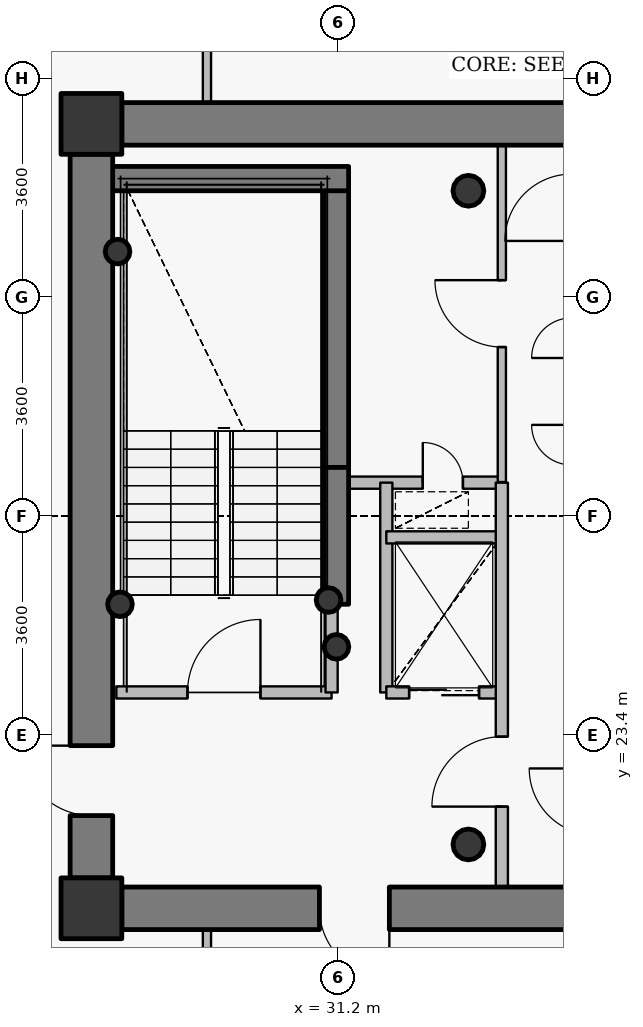
"""IFC4 building model, lengths in metres.
Left out: names, types, materials, properties, quantities, classifications, styles, units other than length and angle.
Written with IfcOpenShell. Run it as: python <this file> out.ifc"""

import sys

from ifc_helpers import new_model, si_unit, direction, frame, frame_2d, origin, origin_2d, place, context, subcontext, project, spatial, rectangle, hollow_circle, extrude, source, transform, mapped, element, fill, save


model = new_model("IFC4")
c1 = context("Model", 3, precision=1e-05, world=origin(), true_north=direction((0.0, 1.0)))
c2 = subcontext(c1, "Body", "Model", "MODEL_VIEW")
j1 = project(units=[si_unit("LENGTHUNIT", "METRE"), si_unit("PLANEANGLEUNIT", "RADIAN")], contexts=[c1])
p1 = place(None, origin())
s1 = spatial("IfcSite", under=j1, at=p1, CompositionType="ELEMENT")
p2 = place(p1, origin())
s2 = spatial("IfcBuilding", under=s1, at=p2, CompositionType="ELEMENT")
p3 = place(p2, frame((0.0, 0.0, 318.0)))
s3 = spatial("IfcBuildingStorey", under=s2, at=p3, CompositionType="ELEMENT", Elevation=318.0)
for number, where, z_axis, x_axis in (
    (1, (27.15, 20.55, 0.0), (0.0, 0.0, 1.0), (1.0, 0.0, 0.0)),
    (2, (27.15, 33.45, 0.0), (0.0, 0.0, 1.0), (1.0, 0.0, 0.0)),
):
    element("IfcColumn", number, at=place(p3, frame(where, z_axis=z_axis, x_axis=x_axis)), inside=s3, PredefinedType="COLUMN", context=c2, shape_type="SweptSolid", body=[
        extrude(rectangle(XDim=1.0, YDim=1.0, at=origin_2d()), origin(), (0.0, 0.0, 1.0), 6.0),
    ])
for number, where, z_axis, x_axis in (
    (3, (33.35, 21.6, 0.0), (0.0, 0.0, 1.0), (1.0, 0.0, 0.0)),
    (4, (33.35, 32.35, 0.0), (0.0, 0.0, 1.0), (1.0, 0.0, 0.0)),
):
    element("IfcColumn", number, at=place(p3, frame(where, z_axis=z_axis, x_axis=x_axis)), inside=s3, PredefinedType="COLUMN", context=c2, shape_type="SweptSolid", body=[
        extrude(hollow_circle(Radius=0.254, WallThickness=0.02, at=origin_2d()), origin(), (0.0, 0.0, 1.0), 6.0),
    ])
p4 = place(p3, frame((31.18, 27.8, 0.0), z_axis=(0.0, 0.0, 1.0), x_axis=(0.0, 1.0, 0.0)))
e5 = element("IfcWall", 5, at=p4, inside=s3, PredefinedType="SHEAR", context=c2, shape_type="SweptSolid", body=[
    extrude(rectangle(XDim=4.75, YDim=0.4, at=frame_2d((2.375, 0.0))), origin(), (0.0, 0.0, 1.0), 6.0),
])
p5 = place(p3, frame((27.25, 32.55, 0.0), z_axis=(0.0, 0.0, 1.0), x_axis=(1.0, 0.0, 0.0)))
e6 = element("IfcWall", 6, at=p5, inside=s3, PredefinedType="SHEAR", context=c2, shape_type="SweptSolid", body=[
    extrude(rectangle(XDim=4.13, YDim=0.4, at=frame_2d((2.065, 0.0))), origin(), (0.0, 0.0, 1.0), 6.0),
])
for number, where, z_axis, x_axis in (
    (7, (27.58, 31.35, 0.0), (0.0, 0.0, 1.0), (1.0, 0.0, 0.0)),
    (8, (31.05, 25.62, 0.0), (0.0, 0.0, 1.0), (1.0, 0.0, 0.0)),
    (9, (31.18, 24.85, 0.0), (0.0, 0.0, 1.0), (1.0, 0.0, 0.0)),
    (10, (27.62, 25.55, 0.0), (0.0, 0.0, 1.0), (1.0, 0.0, 0.0)),
):
    element("IfcColumn", number, at=place(p3, frame(where, z_axis=z_axis, x_axis=x_axis)), inside=s3, PredefinedType="COLUMN", context=c2, shape_type="SweptSolid", body=[
        extrude(hollow_circle(Radius=0.203, WallThickness=0.016, at=origin_2d()), origin(), (0.0, 0.0, 1.0), 6.0),
    ])
p6 = place(p3, frame((27.65, 33.45, 0.0), z_axis=(0.0, 0.0, 1.0), x_axis=(1.0, 0.0, 0.0)))
e11 = element("IfcWall", 11, at=p6, inside=s3, PredefinedType="SHEAR", context=c2, shape_type="SweptSolid", body=[
    extrude(rectangle(XDim=16.7, YDim=0.7, at=frame_2d((8.35, 0.0))), origin(), (0.0, 0.0, 1.0), 5.3),
])
p7 = place(p6, frame((12.15, 0.0, 0.0)))
e12 = element("IfcOpeningElement", 12, at=p7, cuts=e11, PredefinedType="OPENING", context=c2, shape_type="SweptSolid", body=[
    extrude(rectangle(XDim=1.15, YDim=2.15, at=origin_2d()), frame((0.575, 0.36, 1.075), z_axis=(0.0, -1.0, 0.0), x_axis=(1.0, 0.0, 0.0)), (0.0, 0.0, 1.0), 0.72),
])
p8 = place(p3, frame((44.35, 20.55, 0.0), z_axis=(0.0, 0.0, 1.0), x_axis=(-1.0, 0.0, 0.0)))
e13 = element("IfcWall", 13, at=p8, inside=s3, PredefinedType="SHEAR", context=c2, shape_type="SweptSolid", body=[
    extrude(rectangle(XDim=16.7, YDim=0.7, at=frame_2d((8.35, 0.0))), origin(), (0.0, 0.0, 1.0), 5.3),
])
p9 = place(p8, frame((12.3, 0.0, 0.0)))
e14 = element("IfcOpeningElement", 14, at=p9, cuts=e13, PredefinedType="OPENING", context=c2, shape_type="SweptSolid", body=[
    extrude(rectangle(XDim=1.15, YDim=2.15, at=origin_2d()), frame((0.575, 0.36, 1.075), z_axis=(0.0, -1.0, 0.0), x_axis=(1.0, 0.0, 0.0)), (0.0, 0.0, 1.0), 0.72),
])
p10 = place(p3, frame((27.15, 21.05, 0.0), z_axis=(0.0, 0.0, 1.0), x_axis=(0.0, 1.0, 0.0)))
e15 = element("IfcWall", 15, at=p10, inside=s3, PredefinedType="SHEAR", context=c2, shape_type="SweptSolid", body=[
    extrude(rectangle(XDim=11.9, YDim=0.7, at=frame_2d((5.95, 0.0))), origin(), (0.0, 0.0, 1.0), 5.3),
])
p11 = place(p10, frame((1.025, 0.0, 0.0)))
e16 = element("IfcOpeningElement", 16, at=p11, cuts=e15, PredefinedType="OPENING", context=c2, shape_type="SweptSolid", body=[
    extrude(rectangle(XDim=1.15, YDim=2.15, at=origin_2d()), frame((0.575, 0.36, 1.075), z_axis=(0.0, -1.0, 0.0), x_axis=(1.0, 0.0, 0.0)), (0.0, 0.0, 1.0), 0.72),
])
p12 = place(p3, frame((31.18, 25.55, 0.0), z_axis=(0.0, 0.0, 1.0), x_axis=(0.0, 1.0, 0.0)))
e17 = element("IfcWall", 17, at=p12, inside=s3, PredefinedType="SHEAR", context=c2, shape_type="SweptSolid", body=[
    extrude(rectangle(XDim=2.25, YDim=0.4, at=frame_2d((1.125, 0.0))), origin(), (0.0, 0.0, 1.0), 5.35),
])
p13 = place(p3, frame((27.56, 24.1, 0.0), z_axis=(0.0, 0.0, 1.0), x_axis=(1.0, 0.0, 0.0)))
e18 = element("IfcWall", 18, at=p13, inside=s3, PredefinedType="PARTITIONING", context=c2, shape_type="SweptSolid", body=[
    extrude(rectangle(XDim=3.54, YDim=0.2, at=frame_2d((1.77, 0.0))), origin(), (0.0, 0.0, 1.0), 5.75),
])
p14 = place(p13, frame((1.17, 0.0, 0.0)))
e19 = element("IfcOpeningElement", 19, at=p14, cuts=e18, PredefinedType="OPENING", context=c2, shape_type="SweptSolid", body=[
    extrude(rectangle(XDim=1.2, YDim=2.15, at=origin_2d()), frame((0.6, 0.11, 1.075), z_axis=(0.0, -1.0, 0.0), x_axis=(1.0, 0.0, 0.0)), (0.0, 0.0, 1.0), 0.22),
])
p15 = place(p3, frame((29.05, 13.663, 0.0), z_axis=(0.0, 0.0, 1.0), x_axis=(0.0, 1.0, 0.0)))
e20 = element("IfcWall", 20, at=p15, inside=s3, PredefinedType="PARTITIONING", context=c2, shape_type="SweptSolid", body=[
    extrude(rectangle(XDim=6.537, YDim=0.135, at=frame_2d((3.269, 0.0))), origin(), (0.0, 0.0, 1.0), 4.235),
])
p16 = place(p15, frame((4.517, 0.0, 0.0)))
e21 = element("IfcOpeningElement", 21, at=p16, cuts=e20, PredefinedType="OPENING", context=c2, shape_type="SweptSolid", body=[
    extrude(rectangle(XDim=1.1, YDim=2.15, at=origin_2d()), frame((0.55, 0.078, 1.075), z_axis=(0.0, -1.0, 0.0), x_axis=(1.0, 0.0, 0.0)), (0.0, 0.0, 1.0), 0.155),
])
p17 = place(p3, frame((29.05, 33.8, 0.0), z_axis=(0.0, 0.0, 1.0), x_axis=(0.0, 1.0, 0.0)))
e22 = element("IfcWall", 22, at=p17, inside=s3, PredefinedType="PARTITIONING", context=c2, shape_type="SweptSolid", body=[
    extrude(rectangle(XDim=2.9, YDim=0.135, at=frame_2d((1.45, 0.0))), origin(), (0.0, 0.0, 1.0), 5.75),
])
p18 = place(p3, frame((31.1, 24.1, 0.0), z_axis=(0.0, 0.0, 1.0), x_axis=(0.0, 1.0, 0.0)))
e23 = element("IfcWall", 23, at=p18, inside=s3, PredefinedType="PARTITIONING", context=c2, shape_type="SweptSolid", body=[
    extrude(rectangle(XDim=1.44, YDim=0.2, at=frame_2d((0.72, 0.0))), origin(), (0.0, 0.0, 1.0), 5.75),
])
p19 = place(p3, frame((31.1, 27.55, 0.0), z_axis=(0.0, 0.0, 1.0), x_axis=(1.0, 0.0, 0.0)))
e24 = element("IfcWall", 24, at=p19, inside=s3, PredefinedType="PARTITIONING", context=c2, shape_type="SweptSolid", body=[
    extrude(rectangle(XDim=2.8, YDim=0.2, at=frame_2d((1.4, 0.0))), origin(), (0.0, 0.0, 1.0), 5.335),
])
p20 = place(p19, frame((1.5, 0.0, 0.0)))
e25 = element("IfcOpeningElement", 25, at=p20, cuts=e24, PredefinedType="OPENING", context=c2, shape_type="SweptSolid", body=[
    extrude(rectangle(XDim=0.66, YDim=2.05, at=origin_2d()), frame((0.33, 0.11, 1.025), z_axis=(0.0, -1.0, 0.0), x_axis=(1.0, 0.0, 0.0)), (0.0, 0.0, 1.0), 0.22),
])
p21 = place(p3, frame((32.0, 24.1, 0.0), z_axis=(0.0, 0.0, 1.0), x_axis=(0.0, 1.0, 0.0)))
e26 = element("IfcWall", 26, at=p21, inside=s3, PredefinedType="PARTITIONING", context=c2, shape_type="SweptSolid", body=[
    extrude(rectangle(XDim=3.45, YDim=0.2, at=frame_2d((1.725, 0.0))), origin(), (0.0, 0.0, 1.0), 5.75),
])
p22 = place(p3, frame((32.0, 24.1, 0.0), z_axis=(0.0, 0.0, 1.0), x_axis=(1.0, 0.0, 0.0)))
e27 = element("IfcWall", 27, at=p22, inside=s3, PredefinedType="PARTITIONING", context=c2, shape_type="SweptSolid", body=[
    extrude(rectangle(XDim=1.9, YDim=0.2, at=frame_2d((0.95, 0.0))), origin(), (0.0, 0.0, 1.0), 5.335),
])
p23 = place(p22, frame((0.375, 0.0, 0.0)))
e28 = element("IfcOpeningElement", 28, at=p23, cuts=e27, PredefinedType="OPENING", context=c2, shape_type="SweptSolid", body=[
    extrude(rectangle(XDim=1.15, YDim=2.15, at=origin_2d()), frame((0.575, 0.11, 1.075), z_axis=(0.0, -1.0, 0.0), x_axis=(1.0, 0.0, 0.0)), (0.0, 0.0, 1.0), 0.22),
])
p24 = place(p3, frame((32.0, 26.65, 0.0), z_axis=(0.0, 0.0, 1.0), x_axis=(1.0, 0.0, 0.0)))
e29 = element("IfcWall", 29, at=p24, inside=s3, PredefinedType="PARTITIONING", context=c2, shape_type="SweptSolid", body=[
    extrude(rectangle(XDim=1.9, YDim=0.2, at=frame_2d((0.95, 0.0))), origin(), (0.0, 0.0, 1.0), 5.335),
])
p25 = place(p3, frame((33.9, 20.9, 0.0), z_axis=(0.0, 0.0, 1.0), x_axis=(0.0, 1.0, 0.0)))
e30 = element("IfcWall", 30, at=p25, inside=s3, PredefinedType="PARTITIONING", context=c2, shape_type="SweptSolid", body=[
    extrude(rectangle(XDim=6.65, YDim=0.2, at=frame_2d((3.325, 0.0))), origin(), (0.0, 0.0, 1.0), 5.335),
])
p26 = place(p25, frame((1.323, 0.0, 0.0)))
e31 = element("IfcOpeningElement", 31, at=p26, cuts=e30, PredefinedType="OPENING", context=c2, shape_type="SweptSolid", body=[
    extrude(rectangle(XDim=1.15, YDim=2.15, at=origin_2d()), frame((0.575, 0.11, 1.075), z_axis=(0.0, -1.0, 0.0), x_axis=(1.0, 0.0, 0.0)), (0.0, 0.0, 1.0), 0.22),
])
p27 = place(p3, frame((33.9, 27.56, 0.0), z_axis=(0.0, 0.0, 1.0), x_axis=(0.0, 1.0, 0.0)))
e32 = element("IfcWall", 32, at=p27, inside=s3, PredefinedType="PARTITIONING", context=c2, shape_type="SweptSolid", body=[
    extrude(rectangle(XDim=5.54, YDim=0.135, at=frame_2d((2.77, 0.0))), origin(), (0.0, 0.0, 1.0), 5.335),
])
p28 = place(p27, frame((2.22, 0.0, 0.0)))
e33 = element("IfcOpeningElement", 33, at=p28, cuts=e32, PredefinedType="OPENING", context=c2, shape_type="SweptSolid", body=[
    extrude(rectangle(XDim=1.1, YDim=2.15, at=origin_2d()), frame((0.55, 0.078, 1.075), z_axis=(0.0, -1.0, 0.0), x_axis=(1.0, 0.0, 0.0)), (0.0, 0.0, 1.0), 0.155),
])
p29 = place(p3, frame((27.64, 33.8, 0.0), z_axis=(0.0, 0.0, 1.0), x_axis=(-1.0, 0.0, 0.0)))
e34 = element("IfcWall", 34, at=p29, inside=s3, PredefinedType="PARTITIONING", context=c2, shape_type="SweptSolid", body=[
    extrude(rectangle(XDim=0.84, YDim=0.135, at=frame_2d((0.42, 0.0))), origin(), (0.0, 0.0, 1.0), 2.832),
])
p30 = place(p3, frame((26.8, 33.492, 0.0), z_axis=(0.0, 0.0, 1.0), x_axis=(0.0, -1.0, 0.0)))
e35 = element("IfcWall", 35, at=p30, inside=s3, PredefinedType="PARTITIONING", context=c2, shape_type="SweptSolid", body=[
    extrude(rectangle(XDim=0.532, YDim=0.135, at=frame_2d((0.266, 0.0))), origin(), (0.0, 0.0, 1.0), 5.75),
])
p31 = place(p3, frame((26.8, 21.04, 0.0), z_axis=(0.0, 0.0, 1.0), x_axis=(0.0, -1.0, 0.0)))
e36 = element("IfcWall", 36, at=p31, inside=s3, PredefinedType="PARTITIONING", context=c2, shape_type="SweptSolid", body=[
    extrude(rectangle(XDim=0.84, YDim=0.135, at=frame_2d((0.42, 0.0))), origin(), (0.0, 0.0, 1.0), 2.832),
])
p32 = place(p3, frame((27.107, 20.2, 0.0), z_axis=(0.0, 0.0, 1.0), x_axis=(1.0, 0.0, 0.0)))
e37 = element("IfcWall", 37, at=p32, inside=s3, PredefinedType="PARTITIONING", context=c2, shape_type="SweptSolid", body=[
    extrude(rectangle(XDim=0.532, YDim=0.135, at=frame_2d((0.266, 0.0))), origin(), (0.0, 0.0, 1.0), 4.235),
])
m1 = source(origin(), c2, "Body", "SweptSolid", [
    extrude(rectangle(XDim=1.15, YDim=2.15, at=origin_2d()), frame((0.575, 0.025, 1.075), z_axis=(0.0, -1.0, 0.0), x_axis=(1.0, 0.0, 0.0)), (0.0, 0.0, 1.0), 0.05),
])
p33 = place(p9, origin())
e38 = element("IfcDoor", 38, at=p33, inside=s3, OperationType="SINGLE_SWING_LEFT", PredefinedType="DOOR", context=c2, shape_type="MappedRepresentation", body=[
    mapped(m1, transform((0.0, 0.0, 0.0), x_axis=(1.0, 0.0, 0.0), y_axis=(0.0, 1.0, 0.0), z_axis=(0.0, 0.0, 1.0), scale=1.0)),
])
fill(e14, e38)
p34 = place(p11, origin())
e39 = element("IfcDoor", 39, at=p34, inside=s3, OperationType="SINGLE_SWING_RIGHT", PredefinedType="DOOR", context=c2, shape_type="MappedRepresentation", body=[
    mapped(m1, transform((0.0, 0.0, 0.0), x_axis=(1.0, 0.0, 0.0), y_axis=(0.0, 1.0, 0.0), z_axis=(0.0, 0.0, 1.0), scale=1.0)),
])
fill(e16, e39)
p35 = place(p26, origin())
e40 = element("IfcDoor", 40, at=p35, inside=s3, OperationType="SINGLE_SWING_LEFT", PredefinedType="DOOR", context=c2, shape_type="MappedRepresentation", body=[
    mapped(m1, transform((0.0, 0.0, 0.0), x_axis=(1.0, 0.0, 0.0), y_axis=(0.0, 1.0, 0.0), z_axis=(0.0, 0.0, 1.0), scale=1.0)),
])
fill(e31, e40)
m2 = source(origin(), c2, "Body", "SweptSolid", [
    extrude(rectangle(XDim=1.2, YDim=2.15, at=origin_2d()), frame((0.6, 0.025, 1.075), z_axis=(0.0, -1.0, 0.0), x_axis=(1.0, 0.0, 0.0)), (0.0, 0.0, 1.0), 0.05),
])
p36 = place(p14, origin())
e41 = element("IfcDoor", 41, at=p36, inside=s3, OperationType="SINGLE_SWING_RIGHT", PredefinedType="DOOR", context=c2, shape_type="MappedRepresentation", body=[
    mapped(m2, transform((0.0, 0.0, 0.0), x_axis=(1.0, 0.0, 0.0), y_axis=(0.0, 1.0, 0.0), z_axis=(0.0, 0.0, 1.0), scale=1.0)),
])
fill(e19, e41)
m3 = source(origin(), c2, "Body", "SweptSolid", [
    extrude(rectangle(XDim=1.15, YDim=2.15, at=origin_2d()), frame((0.575, 0.025, 1.075), z_axis=(0.0, -1.0, 0.0), x_axis=(1.0, 0.0, 0.0)), (0.0, 0.0, 1.0), 0.05),
])
p37 = place(p23, origin())
e42 = element("IfcDoor", 42, at=p37, inside=s3, OperationType="DOUBLE_DOOR_SLIDING", PredefinedType="USERDEFINED", context=c2, shape_type="MappedRepresentation", body=[
    mapped(m3, transform((0.0, 0.0, 0.0), x_axis=(1.0, 0.0, 0.0), y_axis=(0.0, 1.0, 0.0), z_axis=(0.0, 0.0, 1.0), scale=1.0)),
])
fill(e28, e42)
m4 = source(origin(), c2, "Body", "SweptSolid", [
    extrude(rectangle(XDim=1.1, YDim=2.15, at=origin_2d()), frame((0.55, 0.025, 1.075), z_axis=(0.0, -1.0, 0.0), x_axis=(1.0, 0.0, 0.0)), (0.0, 0.0, 1.0), 0.05),
])
p38 = place(p28, origin())
e43 = element("IfcDoor", 43, at=p38, inside=s3, OperationType="SINGLE_SWING_RIGHT", PredefinedType="DOOR", context=c2, shape_type="MappedRepresentation", body=[
    mapped(m4, transform((0.0, 0.0, 0.0), x_axis=(1.0, 0.0, 0.0), y_axis=(0.0, 1.0, 0.0), z_axis=(0.0, 0.0, 1.0), scale=1.0)),
])
fill(e33, e43)
m5 = source(origin(), c2, "Body", "SweptSolid", [
    extrude(rectangle(XDim=0.66, YDim=2.05, at=origin_2d()), frame((0.33, 0.025, 1.025), z_axis=(0.0, -1.0, 0.0), x_axis=(1.0, 0.0, 0.0)), (0.0, 0.0, 1.0), 0.05),
])
p39 = place(p20, origin())
e44 = element("IfcDoor", 44, at=p39, inside=s3, OperationType="SINGLE_SWING_LEFT", PredefinedType="USERDEFINED", context=c2, shape_type="MappedRepresentation", body=[
    mapped(m5, transform((0.0, 0.0, 0.0), x_axis=(1.0, 0.0, 0.0), y_axis=(0.0, 1.0, 0.0), z_axis=(0.0, 0.0, 1.0), scale=1.0)),
])
fill(e25, e44)
save(model, sys.argv[1])
